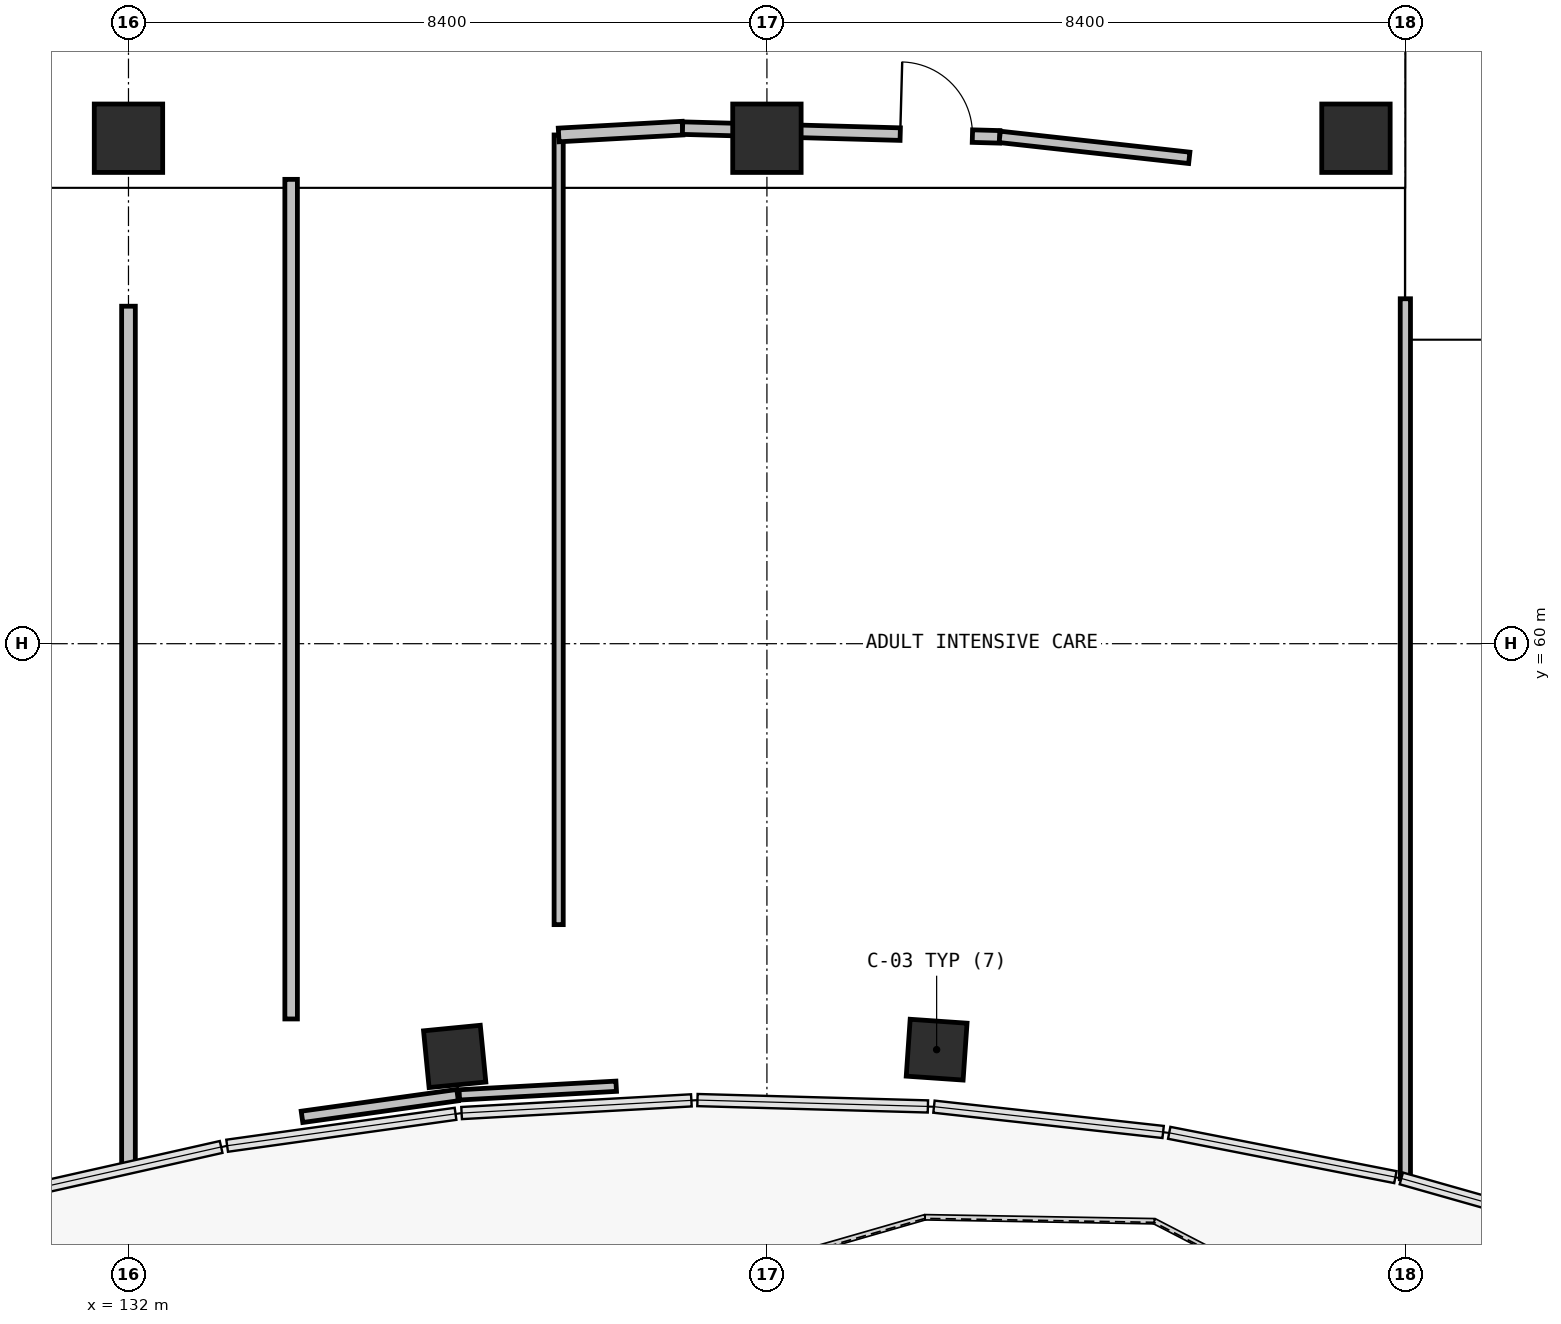
"""IFC4 building model, lengths in metres.
Left out: names, types, materials, properties, quantities, classifications, styles, units other than length and angle.
Written with IfcOpenShell. Run it as: python <this file> out.ifc"""

import sys

from ifc_helpers import new_model, si_unit, direction, frame, frame_2d, origin, origin_2d, place, context, subcontext, project, spatial, rectangle, extrude, element, fill, save


model = new_model("IFC4")
c1 = context("Model", 3, precision=1e-05, world=origin(), true_north=direction((0.0, 1.0)))
c2 = subcontext(c1, "Body", "Model", "MODEL_VIEW")
j1 = project(units=[si_unit("LENGTHUNIT", "METRE"), si_unit("PLANEANGLEUNIT", "RADIAN")], contexts=[c1])
p1 = place(None, origin())
s1 = spatial("IfcSite", under=j1, at=p1, CompositionType="ELEMENT")
p2 = place(p1, origin())
s2 = spatial("IfcBuilding", under=s1, at=p2, CompositionType="ELEMENT")
p3 = place(p2, frame((0.0, 0.0, 5.4)))
s3 = spatial("IfcBuildingStorey", under=s2, at=p3, CompositionType="ELEMENT", Elevation=5.4)
for number, where, z_axis, x_axis in (
    (1, (132.0, 66.65, 0.0), (0.0, 0.0, 1.0), (1.0, 0.0, 0.0)),
    (2, (140.4, 66.65, 0.0), (0.0, 0.0, 1.0), (1.0, 0.0, 0.0)),
    (3, (148.15, 66.65, 0.0), (0.0, 0.0, 1.0), (1.0, 0.0, 0.0)),
):
    element("IfcColumn", number, at=place(p3, frame(where, z_axis=z_axis, x_axis=x_axis)), inside=s3, PredefinedType="COLUMN", context=c2, shape_type="SweptSolid", body=[
        extrude(rectangle(XDim=0.9, YDim=0.9, at=origin_2d()), origin(), (0.0, 0.0, 1.0), 4.8),
    ])
for number, where, z_axis, x_axis in (
    (4, (136.292, 54.57, 0.0), (0.0, 0.0, 1.0), (-0.097, 0.995, 0.0)),
    (5, (142.633, 54.659, 0.0), (0.0, 0.0, 1.0), (0.069, 0.998, 0.0)),
):
    element("IfcColumn", number, at=place(p3, frame(where, z_axis=z_axis, x_axis=x_axis)), inside=s3, PredefinedType="COLUMN", context=c2, shape_type="SweptSolid", body=[
        extrude(rectangle(XDim=0.75, YDim=0.75, at=origin_2d()), origin(), (0.0, 0.0, 1.0), 4.8),
    ])
p4 = place(p3, frame((132.0, 64.44, 0.0), z_axis=(0.0, 0.0, 1.0), x_axis=(0.0, -1.0, 0.0)))
e6 = element("IfcWall", 6, at=p4, inside=s3, PredefinedType="PARTITIONING", context=c2, shape_type="SweptSolid", body=[
    extrude(rectangle(XDim=11.324, YDim=0.18, at=frame_2d((5.662, 0.0))), origin(), (0.0, 0.0, 1.0), 4.445),
])
p5 = place(p3, frame((134.14, 66.109, 0.0), z_axis=(0.0, 0.0, 1.0), x_axis=(0.0, -1.0, 0.0)))
e7 = element("IfcWall", 7, at=p5, inside=s3, PredefinedType="PARTITIONING", context=c2, shape_type="SweptSolid", body=[
    extrude(rectangle(XDim=11.046, YDim=0.165, at=frame_2d((5.523, 0.0))), origin(), (0.0, 0.0, 1.0), 4.445),
])
p6 = place(p3, frame((134.283, 53.775, 0.0), z_axis=(0.0, 0.0, 1.0), x_axis=(0.990372536163, 0.138427741489, 0.0)))
e8 = element("IfcWall", 8, at=p6, inside=s3, PredefinedType="PARTITIONING", context=c2, shape_type="SweptSolid", body=[
    extrude(rectangle(XDim=2.067, YDim=0.15, at=frame_2d((1.034, 0.0))), origin(), (0.0, 0.0, 1.0), 4.445),
])
p7 = place(p3, frame((136.353, 54.064, 0.0), z_axis=(0.0, 0.0, 1.0), x_axis=(0.998477747352, 0.055156033595, 0.0)))
e9 = element("IfcWall", 9, at=p7, inside=s3, PredefinedType="PARTITIONING", context=c2, shape_type="SweptSolid", body=[
    extrude(rectangle(XDim=2.067, YDim=0.135, at=frame_2d((1.034, 0.0))), origin(), (0.0, 0.0, 1.0), 4.445),
])
p8 = place(p3, frame((137.66, 56.304, 0.0), z_axis=(0.0, 0.0, 1.0), x_axis=(0.0, 1.0, 0.0)))
e10 = element("IfcWall", 10, at=p8, inside=s3, PredefinedType="PARTITIONING", context=c2, shape_type="SweptSolid", body=[
    extrude(rectangle(XDim=10.389, YDim=0.12, at=frame_2d((5.195, 0.0))), origin(), (0.0, 0.0, 1.0), 4.445),
])
p9 = place(p3, frame((137.66, 66.693, 0.0), z_axis=(0.0, 0.0, 1.0), x_axis=(0.998484643385, 0.055031054181, 0.0)))
e11 = element("IfcWall", 11, at=p9, inside=s3, PredefinedType="PARTITIONING", context=c2, shape_type="SweptSolid", body=[
    extrude(rectangle(XDim=1.633, YDim=0.18, at=frame_2d((0.816, 0.0))), origin(), (0.0, 0.0, 1.0), 3.695),
])
p10 = place(p3, frame((139.29, 66.783, 0.0), z_axis=(0.0, 0.0, 1.0), x_axis=(0.999620528825, -0.027546294704, 0.0)))
e12 = element("IfcWall", 12, at=p10, inside=s3, PredefinedType="PARTITIONING", context=c2, shape_type="SweptSolid", body=[
    extrude(rectangle(XDim=4.174, YDim=0.165, at=frame_2d((2.087, 0.0))), origin(), (0.0, 0.0, 1.0), 3.695),
])
p11 = place(p10, frame((2.865, 0.0, 0.0)))
e13 = element("IfcOpeningElement", 13, at=p11, cuts=e12, PredefinedType="OPENING", context=c2, shape_type="SweptSolid", body=[
    extrude(rectangle(XDim=0.95, YDim=2.1, at=frame_2d((0.475, 1.05))), frame((0.0, 0.093, 0.0), z_axis=(0.0, -1.0, 0.0), x_axis=(1.0, 0.0, 0.0)), (0.0, 0.0, 1.0), 0.185),
])
p12 = place(p3, frame((143.463, 66.668, 0.0), z_axis=(0.0, 0.0, 1.0), x_axis=(0.993938191899, -0.109940305095, 0.0)))
e14 = element("IfcWall", 14, at=p12, inside=s3, PredefinedType="PARTITIONING", context=c2, shape_type="SweptSolid", body=[
    extrude(rectangle(XDim=2.509, YDim=0.15, at=frame_2d((1.255, 0.0))), origin(), (0.0, 0.0, 1.0), 3.695),
])
p13 = place(p3, frame((148.8, 64.538, 0.0), z_axis=(0.0, 0.0, 1.0), x_axis=(0.0, -1.0, 0.0)))
e15 = element("IfcWall", 15, at=p13, inside=s3, PredefinedType="PARTITIONING", context=c2, shape_type="SweptSolid", body=[
    extrude(rectangle(XDim=11.577, YDim=0.135, at=frame_2d((5.789, 0.0))), origin(), (0.0, 0.0, 1.0), 4.445),
])
p14 = place(p11, origin())
e16 = element("IfcDoor", 16, at=p14, inside=s3, OperationType="SINGLE_SWING_LEFT", PredefinedType="DOOR", context=c2, shape_type="SweptSolid", body=[
    extrude(rectangle(XDim=0.95, YDim=2.1, at=frame_2d((0.475, 1.05))), frame((0.0, 0.025, 0.0), z_axis=(0.0, -1.0, 0.0), x_axis=(1.0, 0.0, 0.0)), (0.0, 0.0, 1.0), 0.05),
])
fill(e13, e16)
save(model, sys.argv[1])
